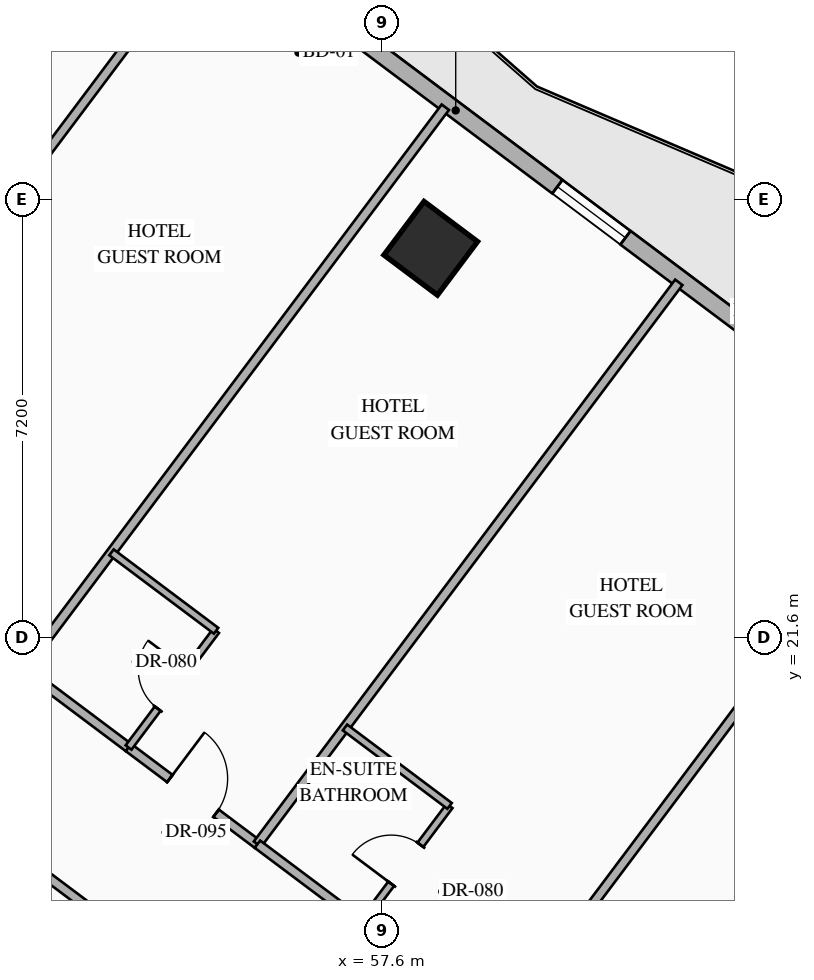
"""IFC4 building model, lengths in metres.
Left out: names, types, materials, properties, quantities, classifications, styles, units other than length and angle.
Written with IfcOpenShell. Run it as: python <this file> out.ifc"""

import sys

from ifc_helpers import new_model, si_unit, direction, frame, frame_2d, origin, origin_2d, place, context, subcontext, project, spatial, rectangle, hollow_rectangle, extrude, element, fill, save


model = new_model("IFC4")
c1 = context("Model", 3, precision=1e-05, world=origin(), true_north=direction((0.0, 1.0)))
c2 = subcontext(c1, "Body", "Model", "MODEL_VIEW")
j1 = project(units=[si_unit("LENGTHUNIT", "METRE"), si_unit("PLANEANGLEUNIT", "RADIAN")], contexts=[c1])
p1 = place(None, origin())
s1 = spatial("IfcSite", under=j1, at=p1, CompositionType="ELEMENT")
p2 = place(p1, origin())
s2 = spatial("IfcBuilding", under=s1, at=p2, CompositionType="ELEMENT")
p3 = place(p2, frame((0.0, 0.0, 36.6)))
s3 = spatial("IfcBuildingStorey", under=s2, at=p3, CompositionType="ELEMENT", Elevation=36.6)
p4 = place(p3, frame((58.4, 28.0, 0.0), z_axis=(0.0, 0.0, 1.0), x_axis=(0.799999996291, -0.600000004945, 0.0)))
e1 = element("IfcColumn", 1, at=p4, inside=s3, PredefinedType="COLUMN", context=c2, shape_type="SweptSolid", body=[
    extrude(hollow_rectangle(XDim=1.1, YDim=1.1, WallThickness=0.04, at=origin_2d()), origin(), (0.0, 0.0, 1.0), 3.35),
])
p5 = place(p3, frame((44.86, 40.73, 0.0), z_axis=(0.0, 0.0, 1.0), x_axis=(0.800006902154, -0.599990797017, 0.0)))
e2 = element("IfcWall", 2, at=p5, inside=s3, PredefinedType="STANDARD", context=c2, shape_type="SweptSolid", body=[
    extrude(rectangle(XDim=29.712, YDim=0.28, at=frame_2d((14.856, 0.0))), origin(), (0.0, 0.0, 1.0), 3.13),
])
p6 = place(p5, frame((14.249, 0.0, 0.0)))
e3 = element("IfcOpeningElement", 3, at=p6, cuts=e2, PredefinedType="OPENING", context=c2, shape_type="SweptSolid", body=[
    extrude(rectangle(XDim=1.1, YDim=2.2, at=frame_2d((0.55, 1.1))), frame((0.0, 0.15, 0.0), z_axis=(0.0, -1.0, 0.0), x_axis=(1.0, 0.0, 0.0)), (0.0, 0.0, 1.0), 0.3),
])
p7 = place(p5, frame((1.612, 0.0, 0.85)))
e4 = element("IfcOpeningElement", 4, at=p7, cuts=e2, PredefinedType="OPENING", context=c2, shape_type="SweptSolid", body=[
    extrude(rectangle(XDim=1.4, YDim=1.8, at=frame_2d((0.7, 0.9))), frame((0.0, 0.15, 0.0), z_axis=(0.0, -1.0, 0.0), x_axis=(1.0, 0.0, 0.0)), (0.0, 0.0, 1.0), 0.3),
])
p8 = place(p5, frame((5.667, 0.0, 0.85)))
e5 = element("IfcOpeningElement", 5, at=p8, cuts=e2, PredefinedType="OPENING", context=c2, shape_type="SweptSolid", body=[
    extrude(rectangle(XDim=1.4, YDim=1.8, at=frame_2d((0.7, 0.9))), frame((0.0, 0.15, 0.0), z_axis=(0.0, -1.0, 0.0), x_axis=(1.0, 0.0, 0.0)), (0.0, 0.0, 1.0), 0.3),
])
p9 = place(p5, frame((9.912, 0.0, 0.85)))
e6 = element("IfcOpeningElement", 6, at=p9, cuts=e2, PredefinedType="OPENING", context=c2, shape_type="SweptSolid", body=[
    extrude(rectangle(XDim=1.4, YDim=1.8, at=frame_2d((0.7, 0.9))), frame((0.0, 0.15, 0.0), z_axis=(0.0, -1.0, 0.0), x_axis=(1.0, 0.0, 0.0)), (0.0, 0.0, 1.0), 0.3),
])
p10 = place(p5, frame((19.528, 0.0, 0.85)))
e7 = element("IfcOpeningElement", 7, at=p10, cuts=e2, PredefinedType="OPENING", context=c2, shape_type="SweptSolid", body=[
    extrude(rectangle(XDim=1.4, YDim=1.8, at=frame_2d((0.7, 0.9))), frame((0.0, 0.15, 0.0), z_axis=(0.0, -1.0, 0.0), x_axis=(1.0, 0.0, 0.0)), (0.0, 0.0, 1.0), 0.3),
])
p11 = place(p5, frame((23.451, 0.0, 0.85)))
e8 = element("IfcOpeningElement", 8, at=p11, cuts=e2, PredefinedType="OPENING", context=c2, shape_type="SweptSolid", body=[
    extrude(rectangle(XDim=1.4, YDim=1.8, at=frame_2d((0.7, 0.9))), frame((0.0, 0.15, 0.0), z_axis=(0.0, -1.0, 0.0), x_axis=(1.0, 0.0, 0.0)), (0.0, 0.0, 1.0), 0.3),
])
p12 = place(p5, frame((27.852, 0.0, 0.85)))
e9 = element("IfcOpeningElement", 9, at=p12, cuts=e2, PredefinedType="OPENING", context=c2, shape_type="SweptSolid", body=[
    extrude(rectangle(XDim=1.4, YDim=1.8, at=frame_2d((0.7, 0.9))), frame((0.0, 0.15, 0.0), z_axis=(0.0, -1.0, 0.0), x_axis=(1.0, 0.0, 0.0)), (0.0, 0.0, 1.0), 0.3),
])
p13 = place(p3, frame((53.318, 2.487, 0.0), z_axis=(0.0, 0.0, 1.0), x_axis=(-0.800004174678, 0.599994433723, 0.0)))
e10 = element("IfcWall", 10, at=p13, inside=s3, PredefinedType="STANDARD", context=c2, shape_type="SweptSolid", body=[
    extrude(rectangle(XDim=35.089, YDim=0.28, at=frame_2d((17.544, 0.0))), origin(), (0.0, 0.0, 1.0), 3.13),
])
p14 = place(p13, frame((1.931, 0.0, 0.85)))
e11 = element("IfcOpeningElement", 11, at=p14, cuts=e10, PredefinedType="OPENING", context=c2, shape_type="SweptSolid", body=[
    extrude(rectangle(XDim=1.4, YDim=1.8, at=frame_2d((0.7, 0.9))), frame((0.0, 0.15, 0.0), z_axis=(0.0, -1.0, 0.0), x_axis=(1.0, 0.0, 0.0)), (0.0, 0.0, 1.0), 0.3),
])
p15 = place(p13, frame((6.819, 0.0, 0.85)))
e12 = element("IfcOpeningElement", 12, at=p15, cuts=e10, PredefinedType="OPENING", context=c2, shape_type="SweptSolid", body=[
    extrude(rectangle(XDim=1.4, YDim=1.8, at=frame_2d((0.7, 0.9))), frame((0.0, 0.15, 0.0), z_axis=(0.0, -1.0, 0.0), x_axis=(1.0, 0.0, 0.0)), (0.0, 0.0, 1.0), 0.3),
])
p16 = place(p13, frame((11.832, 0.0, 0.85)))
e13 = element("IfcOpeningElement", 13, at=p16, cuts=e10, PredefinedType="OPENING", context=c2, shape_type="SweptSolid", body=[
    extrude(rectangle(XDim=1.4, YDim=1.8, at=frame_2d((0.7, 0.9))), frame((0.0, 0.15, 0.0), z_axis=(0.0, -1.0, 0.0), x_axis=(1.0, 0.0, 0.0)), (0.0, 0.0, 1.0), 0.3),
])
p17 = place(p13, frame((17.647, 0.0, 0.85)))
e14 = element("IfcOpeningElement", 14, at=p17, cuts=e10, PredefinedType="OPENING", context=c2, shape_type="SweptSolid", body=[
    extrude(rectangle(XDim=1.4, YDim=1.8, at=frame_2d((0.7, 0.9))), frame((0.0, 0.15, 0.0), z_axis=(0.0, -1.0, 0.0), x_axis=(1.0, 0.0, 0.0)), (0.0, 0.0, 1.0), 0.3),
])
p18 = place(p13, frame((21.857, 0.0, 0.85)))
e15 = element("IfcOpeningElement", 15, at=p18, cuts=e10, PredefinedType="OPENING", context=c2, shape_type="SweptSolid", body=[
    extrude(rectangle(XDim=1.4, YDim=1.8, at=frame_2d((0.7, 0.9))), frame((0.0, 0.15, 0.0), z_axis=(0.0, -1.0, 0.0), x_axis=(1.0, 0.0, 0.0)), (0.0, 0.0, 1.0), 0.3),
])
p19 = place(p13, frame((26.87, 0.0, 0.85)))
e16 = element("IfcOpeningElement", 16, at=p19, cuts=e10, PredefinedType="OPENING", context=c2, shape_type="SweptSolid", body=[
    extrude(rectangle(XDim=1.4, YDim=1.8, at=frame_2d((0.7, 0.9))), frame((0.0, 0.15, 0.0), z_axis=(0.0, -1.0, 0.0), x_axis=(1.0, 0.0, 0.0)), (0.0, 0.0, 1.0), 0.3),
])
p20 = place(p13, frame((31.757, 0.0, 0.85)))
e17 = element("IfcOpeningElement", 17, at=p20, cuts=e10, PredefinedType="OPENING", context=c2, shape_type="SweptSolid", body=[
    extrude(rectangle(XDim=1.4, YDim=1.8, at=frame_2d((0.7, 0.9))), frame((0.0, 0.15, 0.0), z_axis=(0.0, -1.0, 0.0), x_axis=(1.0, 0.0, 0.0)), (0.0, 0.0, 1.0), 0.3),
])
for number, where, z_axis, x_axis in (
    (18, (47.87, 23.96, 0.0), (0.0, 0.0, 1.0), (0.6, 0.8, 0.0)),
    (19, (51.71, 21.08, 0.0), (0.0, 0.0, 1.0), (0.6, 0.8, 0.0)),
):
    element("IfcWall", number, at=place(p3, frame(where, z_axis=z_axis, x_axis=x_axis)), inside=s3, PredefinedType="PARTITIONING", context=c2, shape_type="SweptSolid", body=[
        extrude(rectangle(XDim=11.55, YDim=0.15, at=frame_2d((5.775, 0.0))), origin(), (0.0, 0.0, 1.0), 3.13),
    ])
p21 = place(p3, frame((51.71, 21.08, 0.0), z_axis=(0.0, 0.0, 1.0), x_axis=(0.79998637334, -0.60001816845, 0.0)))
e20 = element("IfcWall", 20, at=p21, inside=s3, PredefinedType="PARTITIONING", context=c2, shape_type="SweptSolid", body=[
    extrude(rectangle(XDim=2.15, YDim=0.15, at=frame_2d((1.075, 0.0))), origin(), (0.0, 0.0, 1.0), 2.775),
])
p22 = place(p3, frame((53.43, 19.79, 0.0), z_axis=(0.0, 0.0, 1.0), x_axis=(0.8, -0.6, 0.0)))
e21 = element("IfcWall", 21, at=p22, inside=s3, PredefinedType="PARTITIONING", context=c2, shape_type="SweptSolid", body=[
    extrude(rectangle(XDim=2.65, YDim=0.15, at=frame_2d((1.325, 0.0))), origin(), (0.0, 0.0, 1.0), 2.775),
])
p23 = place(p22, frame((0.85, 0.0, 0.0)))
e22 = element("IfcOpeningElement", 22, at=p23, cuts=e21, PredefinedType="OPENING", context=c2, shape_type="SweptSolid", body=[
    extrude(rectangle(XDim=0.95, YDim=2.15, at=frame_2d((0.475, 1.075))), frame((0.0, 0.085, 0.0), z_axis=(0.0, -1.0, 0.0), x_axis=(1.0, 0.0, 0.0)), (0.0, 0.0, 1.0), 0.17),
])
p24 = place(p3, frame((53.43, 19.79, 0.0), z_axis=(0.0, 0.0, 1.0), x_axis=(0.600065100855, 0.79995117022, 0.0)))
e23 = element("IfcWall", 23, at=p24, inside=s3, PredefinedType="PARTITIONING", context=c2, shape_type="SweptSolid", body=[
    extrude(rectangle(XDim=2.4, YDim=0.12, at=frame_2d((1.2, 0.0))), origin(), (0.0, 0.0, 1.0), 3.13),
])
p25 = place(p24, frame((0.8, 0.0, 0.0)))
e24 = element("IfcOpeningElement", 24, at=p25, cuts=e23, PredefinedType="OPENING", context=c2, shape_type="SweptSolid", body=[
    extrude(rectangle(XDim=0.8, YDim=2.06, at=frame_2d((0.4, 1.03))), frame((0.0, 0.07, 0.0), z_axis=(0.0, -1.0, 0.0), x_axis=(1.0, 0.0, 0.0)), (0.0, 0.0, 1.0), 0.14),
])
p26 = place(p3, frame((53.15, 23.0, 0.0), z_axis=(0.0, 0.0, 1.0), x_axis=(0.800027249606, -0.599963665473, 0.0)))
e25 = element("IfcWall", 25, at=p26, inside=s3, PredefinedType="PARTITIONING", context=c2, shape_type="SweptSolid", body=[
    extrude(rectangle(XDim=2.15, YDim=0.12, at=frame_2d((1.075, 0.0))), origin(), (0.0, 0.0, 1.0), 3.13),
])
p27 = place(p3, frame((55.55, 18.2, 0.0), z_axis=(0.0, 0.0, 1.0), x_axis=(0.599996617946, 0.80000253653, 0.0)))
e26 = element("IfcWall", 26, at=p27, inside=s3, PredefinedType="PARTITIONING", context=c2, shape_type="SweptSolid", body=[
    extrude(rectangle(XDim=11.55, YDim=0.15, at=frame_2d((5.775, 0.0))), origin(), (0.0, 0.0, 1.0), 3.13),
])
p28 = place(p3, frame((55.55, 18.2, 0.0), z_axis=(0.0, 0.0, 1.0), x_axis=(0.79998637334, -0.60001816845, 0.0)))
e27 = element("IfcWall", 27, at=p28, inside=s3, PredefinedType="PARTITIONING", context=c2, shape_type="SweptSolid", body=[
    extrude(rectangle(XDim=2.15, YDim=0.15, at=frame_2d((1.075, 0.0))), origin(), (0.0, 0.0, 1.0), 2.775),
])
p29 = place(p3, frame((57.27, 16.91, 0.0), z_axis=(0.0, 0.0, 1.0), x_axis=(0.599951172744, 0.800036618114, 0.0)))
e28 = element("IfcWall", 28, at=p29, inside=s3, PredefinedType="PARTITIONING", context=c2, shape_type="SweptSolid", body=[
    extrude(rectangle(XDim=2.4, YDim=0.12, at=frame_2d((1.2, 0.0))), origin(), (0.0, 0.0, 1.0), 3.13),
])
p30 = place(p29, frame((0.8, 0.0, 0.0)))
e29 = element("IfcOpeningElement", 29, at=p30, cuts=e28, PredefinedType="OPENING", context=c2, shape_type="SweptSolid", body=[
    extrude(rectangle(XDim=0.8, YDim=2.06, at=frame_2d((0.4, 1.03))), frame((0.0, 0.07, 0.0), z_axis=(0.0, -1.0, 0.0), x_axis=(1.0, 0.0, 0.0)), (0.0, 0.0, 1.0), 0.14),
])
p31 = place(p3, frame((56.99, 20.12, 0.0), z_axis=(0.0, 0.0, 1.0), x_axis=(0.79998637334, -0.60001816845, 0.0)))
e30 = element("IfcWall", 30, at=p31, inside=s3, PredefinedType="PARTITIONING", context=c2, shape_type="SweptSolid", body=[
    extrude(rectangle(XDim=2.15, YDim=0.12, at=frame_2d((1.075, 0.0))), origin(), (0.0, 0.0, 1.0), 3.13),
])
p32 = place(p3, frame((59.55, 15.2, 0.0), z_axis=(0.0, 0.0, 1.0), x_axis=(0.599996617946, 0.80000253653, 0.0)))
e31 = element("IfcWall", 31, at=p32, inside=s3, PredefinedType="PARTITIONING", context=c2, shape_type="SweptSolid", body=[
    extrude(rectangle(XDim=11.55, YDim=0.15, at=frame_2d((5.775, 0.0))), origin(), (0.0, 0.0, 1.0), 3.13),
])
p33 = place(p3, frame((51.17, 18.36, 0.0), z_axis=(0.0, 0.0, 1.0), x_axis=(0.79998637334, -0.60001816845, 0.0)))
e32 = element("IfcWall", 32, at=p33, inside=s3, PredefinedType="PARTITIONING", context=c2, shape_type="SweptSolid", body=[
    extrude(rectangle(XDim=2.15, YDim=0.15, at=frame_2d((1.075, 0.0))), origin(), (0.0, 0.0, 1.0), 2.425),
])
p34 = place(p10, origin())
e33 = element("IfcWindow", 33, at=p34, inside=s3, PartitioningType="SINGLE_PANEL", PredefinedType="WINDOW", context=c2, shape_type="SweptSolid", body=[
    extrude(rectangle(XDim=1.4, YDim=1.8, at=frame_2d((0.7, 0.9))), frame((0.0, 0.03, 0.0), z_axis=(0.0, -1.0, 0.0), x_axis=(1.0, 0.0, 0.0)), (0.0, 0.0, 1.0), 0.06),
])
fill(e7, e33)
p35 = place(p23, origin())
e34 = element("IfcDoor", 34, at=p35, inside=s3, OperationType="SINGLE_SWING_LEFT", PredefinedType="DOOR", context=c2, shape_type="SweptSolid", body=[
    extrude(rectangle(XDim=0.95, YDim=2.15, at=frame_2d((0.475, 1.075))), frame((0.0, 0.025, 0.0), z_axis=(0.0, -1.0, 0.0), x_axis=(1.0, 0.0, 0.0)), (0.0, 0.0, 1.0), 0.05),
])
fill(e22, e34)
p36 = place(p25, origin())
e35 = element("IfcDoor", 35, at=p36, inside=s3, OperationType="SINGLE_SWING_RIGHT", PredefinedType="DOOR", context=c2, shape_type="SweptSolid", body=[
    extrude(rectangle(XDim=0.8, YDim=2.06, at=frame_2d((0.4, 1.03))), frame((0.0, 0.025, 0.0), z_axis=(0.0, -1.0, 0.0), x_axis=(1.0, 0.0, 0.0)), (0.0, 0.0, 1.0), 0.05),
])
fill(e24, e35)
p37 = place(p30, origin())
e36 = element("IfcDoor", 36, at=p37, inside=s3, OperationType="SINGLE_SWING_LEFT", PredefinedType="DOOR", context=c2, shape_type="SweptSolid", body=[
    extrude(rectangle(XDim=0.8, YDim=2.06, at=frame_2d((0.4, 1.03))), frame((0.0, 0.025, 0.0), z_axis=(0.0, -1.0, 0.0), x_axis=(1.0, 0.0, 0.0)), (0.0, 0.0, 1.0), 0.05),
])
fill(e29, e36)
save(model, sys.argv[1])
